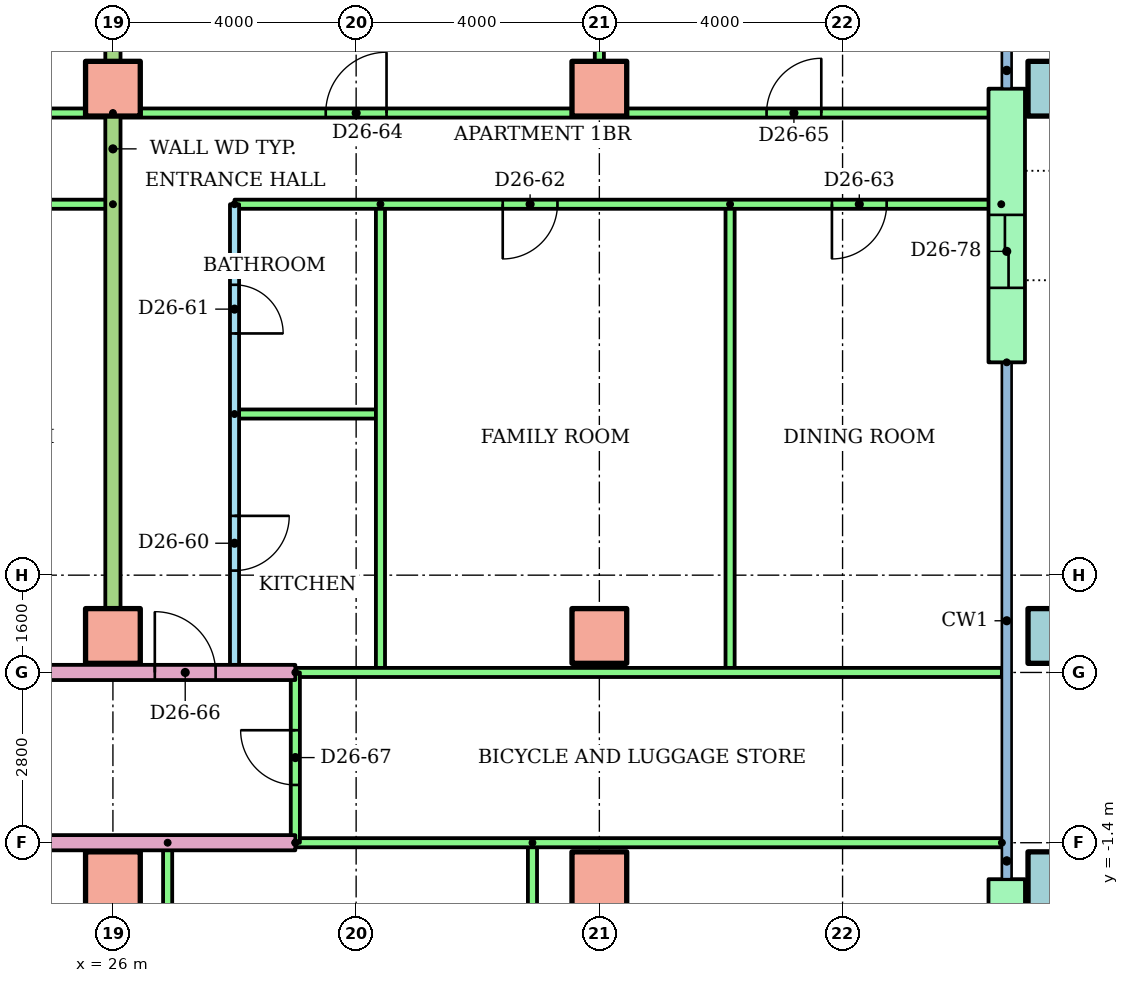
"""IFC4 building model, lengths in metres.
Left out: names, types, materials, properties, quantities, classifications, styles, units other than length and angle.
Written with IfcOpenShell. Run it as: python <this file> out.ifc"""

import sys

from ifc_helpers import new_model, si_unit, direction, frame, frame_2d, origin, origin_2d, place, context, subcontext, project, spatial, rectangle, hollow_rectangle, extrude, element, fill, save


model = new_model("IFC4")
c1 = context("Model", 3, precision=1e-05, world=origin(), true_north=direction((0.0, 1.0)))
c2 = subcontext(c1, "Body", "Model", "MODEL_VIEW")
j1 = project(units=[si_unit("LENGTHUNIT", "METRE"), si_unit("PLANEANGLEUNIT", "RADIAN")], contexts=[c1])
p1 = place(None, origin())
s1 = spatial("IfcSite", under=j1, at=p1, CompositionType="ELEMENT")
p2 = place(p1, origin())
s2 = spatial("IfcBuilding", under=s1, at=p2, CompositionType="ELEMENT")
p3 = place(p2, frame((0.0, 0.0, 99.9)))
s3 = spatial("IfcBuildingStorey", under=s2, at=p3, CompositionType="ELEMENT", Elevation=99.9)
for number, where in (
    (1, (26.0, -2.0, 0.0)),
    (2, (34.0, -2.0, 0.0)),
):
    element("IfcColumn", number, at=place(p3, frame(where)), inside=s3, PredefinedType="COLUMN", context=c2, shape_type="SweptSolid", body=[
        extrude(rectangle(XDim=0.9, YDim=0.9, at=origin_2d()), origin(), (0.0, 0.0, 1.0), 3.2),
    ])
p4 = place(p3, frame((41.5, -2.0, 0.0)))
e3 = element("IfcColumn", 3, at=p4, inside=s3, PredefinedType="COLUMN", context=c2, shape_type="SweptSolid", body=[
    extrude(hollow_rectangle(XDim=0.9, YDim=0.9, WallThickness=0.045, at=origin_2d()), origin(), (0.0, 0.0, 1.0), 3.2),
])
for number, where in (
    (4, (26.0, 2.0, 0.0)),
    (5, (34.0, 2.0, 0.0)),
):
    element("IfcColumn", number, at=place(p3, frame(where)), inside=s3, PredefinedType="COLUMN", context=c2, shape_type="SweptSolid", body=[
        extrude(rectangle(XDim=0.9, YDim=0.9, at=origin_2d()), origin(), (0.0, 0.0, 1.0), 3.2),
    ])
p5 = place(p3, frame((41.5, 2.0, 0.0)))
e6 = element("IfcColumn", 6, at=p5, inside=s3, PredefinedType="COLUMN", context=c2, shape_type="SweptSolid", body=[
    extrude(hollow_rectangle(XDim=0.9, YDim=0.9, WallThickness=0.045, at=origin_2d()), origin(), (0.0, 0.0, 1.0), 3.2),
])
for number, where in (
    (7, (26.0, 11.0, 0.0)),
    (8, (34.0, 11.0, 0.0)),
):
    element("IfcColumn", number, at=place(p3, frame(where)), inside=s3, PredefinedType="COLUMN", context=c2, shape_type="SweptSolid", body=[
        extrude(rectangle(XDim=0.9, YDim=0.9, at=origin_2d()), origin(), (0.0, 0.0, 1.0), 3.2),
    ])
p6 = place(p3, frame((41.5, 11.0, 0.0)))
e9 = element("IfcColumn", 9, at=p6, inside=s3, PredefinedType="COLUMN", context=c2, shape_type="SweptSolid", body=[
    extrude(hollow_rectangle(XDim=0.9, YDim=0.9, WallThickness=0.045, at=origin_2d()), origin(), (0.0, 0.0, 1.0), 3.2),
])
p7 = place(p3, frame((40.7, -5.7, 0.0), z_axis=(0.0, 0.0, 1.0), x_axis=(0.0, 1.0, 0.0)))
e10 = element("IfcWall", 10, at=p7, inside=s3, PredefinedType="STANDARD", context=c2, shape_type="SweptSolid", body=[
    extrude(rectangle(XDim=3.7, YDim=0.6, at=frame_2d((1.85, 0.0))), origin(), (0.0, 0.0, 1.0), 2.92),
])
p8 = place(p7, frame((1.25, 0.0, 0.0)))
e11 = element("IfcOpeningElement", 11, at=p8, cuts=e10, PredefinedType="OPENING", context=c2, shape_type="SweptSolid", body=[
    extrude(rectangle(XDim=1.2, YDim=2.1, at=frame_2d((0.6, 1.05))), frame((0.0, 0.31, 0.0), z_axis=(0.0, -1.0, 0.0), x_axis=(1.0, 0.0, 0.0)), (0.0, 0.0, 1.0), 0.62),
])
p9 = place(p3, frame((40.7, 6.5, 0.0), z_axis=(0.0, 0.0, 1.0), x_axis=(0.0, 1.0, 0.0)))
e12 = element("IfcWall", 12, at=p9, inside=s3, PredefinedType="STANDARD", context=c2, shape_type="SweptSolid", body=[
    extrude(rectangle(XDim=4.5, YDim=0.6, at=frame_2d((2.25, 0.0))), origin(), (0.0, 0.0, 1.0), 2.92),
])
p10 = place(p9, frame((1.225, 0.0, 0.0)))
e13 = element("IfcOpeningElement", 13, at=p10, cuts=e12, PredefinedType="OPENING", context=c2, shape_type="SweptSolid", body=[
    extrude(rectangle(XDim=1.2, YDim=2.1, at=frame_2d((0.6, 1.05))), frame((0.0, 0.31, 0.0), z_axis=(0.0, -1.0, 0.0), x_axis=(1.0, 0.0, 0.0)), (0.0, 0.0, 1.0), 0.62),
])
for number, where, z_axis, x_axis in (
    (14, (26.9, -1.4, 0.0), (0.0, 0.0, 1.0), (0.0, -1.0, 0.0)),
    (15, (32.9, -1.4, 0.0), (0.0, 0.0, 1.0), (0.0, -1.0, 0.0)),
):
    element("IfcWall", number, at=place(p3, frame(where, z_axis=z_axis, x_axis=x_axis)), inside=s3, PredefinedType="PARTITIONING", context=c2, shape_type="SweptSolid", body=[
        extrude(rectangle(XDim=5.3, YDim=0.15, at=frame_2d((2.65, 0.0))), origin(), (0.0, 0.0, 1.0), 2.4),
    ])
p11 = place(p3, frame((29.0, -1.4, 0.0), z_axis=(0.0, 0.0, 1.0), x_axis=(-1.0, 0.0, 0.0)))
e16 = element("IfcWall", 16, at=p11, inside=s3, PredefinedType="PARTITIONING", context=c2, shape_type="SweptSolid", body=[
    extrude(rectangle(XDim=15.0, YDim=0.25, at=frame_2d((7.5, 0.0))), origin(), (0.0, 0.0, 1.0), 2.4),
])
p12 = place(p11, frame((9.311, 0.0, 0.0)))
e17 = element("IfcOpeningElement", 17, at=p12, cuts=e16, PredefinedType="OPENING", context=c2, shape_type="SweptSolid", body=[
    extrude(rectangle(XDim=1.0, YDim=2.1, at=frame_2d((0.5, 1.05))), frame((0.0, 0.135, 0.0), z_axis=(0.0, -1.0, 0.0), x_axis=(1.0, 0.0, 0.0)), (0.0, 0.0, 1.0), 0.27),
])
p13 = place(p3, frame((40.62, -1.4, 0.0), z_axis=(0.0, 0.0, 1.0), x_axis=(-1.0, 0.0, 0.0)))
e18 = element("IfcWall", 18, at=p13, inside=s3, PredefinedType="PARTITIONING", context=c2, shape_type="SweptSolid", body=[
    extrude(rectangle(XDim=11.62, YDim=0.15, at=frame_2d((5.81, 0.0))), origin(), (0.0, 0.0, 1.0), 2.4),
])
p14 = place(p3, frame((26.0, 9.1, 0.0), z_axis=(0.0, 0.0, 1.0), x_axis=(-1.0, 0.0, 0.0)))
e19 = element("IfcWall", 19, at=p14, inside=s3, PredefinedType="PARTITIONING", context=c2, shape_type="SweptSolid", body=[
    extrude(rectangle(XDim=10.0, YDim=0.15, at=frame_2d((5.0, 0.0))), origin(), (0.0, 0.0, 1.0), 2.4),
])
p15 = place(p14, frame((5.525, 0.0, 0.0)))
e20 = element("IfcOpeningElement", 20, at=p15, cuts=e19, PredefinedType="OPENING", context=c2, shape_type="SweptSolid", body=[
    extrude(rectangle(XDim=0.9, YDim=2.1, at=frame_2d((0.45, 1.05))), frame((0.0, 0.085, 0.0), z_axis=(0.0, -1.0, 0.0), x_axis=(1.0, 0.0, 0.0)), (0.0, 0.0, 1.0), 0.17),
])
p16 = place(p14, frame((1.725, 0.0, 0.0)))
e21 = element("IfcOpeningElement", 21, at=p16, cuts=e19, PredefinedType="OPENING", context=c2, shape_type="SweptSolid", body=[
    extrude(rectangle(XDim=0.9, YDim=2.1, at=frame_2d((0.45, 1.05))), frame((0.0, 0.085, 0.0), z_axis=(0.0, -1.0, 0.0), x_axis=(1.0, 0.0, 0.0)), (0.0, 0.0, 1.0), 0.17),
])
p17 = place(p3, frame((14.0, 10.6, 0.0)))
e22 = element("IfcWall", 22, at=p17, inside=s3, PredefinedType="PARTITIONING", context=c2, shape_type="SweptSolid", body=[
    extrude(rectangle(XDim=12.0, YDim=0.15, at=frame_2d((6.0, 0.0))), origin(), (0.0, 0.0, 1.0), 2.4),
])
p18 = place(p17, frame((1.5, 0.0, 0.0)))
e23 = element("IfcOpeningElement", 23, at=p18, cuts=e22, PredefinedType="OPENING", context=c2, shape_type="SweptSolid", body=[
    extrude(rectangle(XDim=1.0, YDim=2.1, at=frame_2d((0.5, 1.05))), frame((0.0, 0.085, 0.0), z_axis=(0.0, -1.0, 0.0), x_axis=(1.0, 0.0, 0.0)), (0.0, 0.0, 1.0), 0.17),
])
p19 = place(p17, frame((7.5, 0.0, 0.0)))
e24 = element("IfcOpeningElement", 24, at=p19, cuts=e22, PredefinedType="OPENING", context=c2, shape_type="SweptSolid", body=[
    extrude(rectangle(XDim=1.0, YDim=2.1, at=frame_2d((0.5, 1.05))), frame((0.0, 0.085, 0.0), z_axis=(0.0, -1.0, 0.0), x_axis=(1.0, 0.0, 0.0)), (0.0, 0.0, 1.0), 0.17),
])
p20 = place(p3, frame((28.0, 9.1, 0.0), z_axis=(0.0, 0.0, 1.0), x_axis=(0.0, -1.0, 0.0)))
e25 = element("IfcWall", 25, at=p20, inside=s3, PredefinedType="PARTITIONING", context=c2, shape_type="SweptSolid", body=[
    extrude(rectangle(XDim=7.7, YDim=0.15, at=frame_2d((3.85, 0.0))), origin(), (0.0, 0.0, 1.0), 2.4),
])
p21 = place(p20, frame((5.125, 0.0, 0.0)))
e26 = element("IfcOpeningElement", 26, at=p21, cuts=e25, PredefinedType="OPENING", context=c2, shape_type="SweptSolid", body=[
    extrude(rectangle(XDim=0.9, YDim=2.1, at=frame_2d((0.45, 1.05))), frame((0.0, 0.085, 0.0), z_axis=(0.0, -1.0, 0.0), x_axis=(1.0, 0.0, 0.0)), (0.0, 0.0, 1.0), 0.17),
])
p22 = place(p20, frame((1.325, 0.0, 0.0)))
e27 = element("IfcOpeningElement", 27, at=p22, cuts=e25, PredefinedType="OPENING", context=c2, shape_type="SweptSolid", body=[
    extrude(rectangle(XDim=0.8, YDim=2.1, at=frame_2d((0.4, 1.05))), frame((0.0, 0.085, 0.0), z_axis=(0.0, -1.0, 0.0), x_axis=(1.0, 0.0, 0.0)), (0.0, 0.0, 1.0), 0.17),
])
p23 = place(p3, frame((28.0, 5.65, 0.0)))
e28 = element("IfcWall", 28, at=p23, inside=s3, PredefinedType="PARTITIONING", context=c2, shape_type="SweptSolid", body=[
    extrude(rectangle(XDim=2.4, YDim=0.15, at=frame_2d((1.2, 0.0))), origin(), (0.0, 0.0, 1.0), 2.4),
])
for number, where, z_axis, x_axis in (
    (29, (30.4, 9.1, 0.0), (0.0, 0.0, 1.0), (0.0, -1.0, 0.0)),
    (30, (36.15, 9.1, 0.0), (0.0, 0.0, 1.0), (0.0, -1.0, 0.0)),
):
    element("IfcWall", number, at=place(p3, frame(where, z_axis=z_axis, x_axis=x_axis)), inside=s3, PredefinedType="PARTITIONING", context=c2, shape_type="SweptSolid", body=[
        extrude(rectangle(XDim=7.7, YDim=0.15, at=frame_2d((3.85, 0.0))), origin(), (0.0, 0.0, 1.0), 2.4),
    ])
p24 = place(p3, frame((40.61, 9.1, 0.0), z_axis=(0.0, 0.0, 1.0), x_axis=(-1.0, 0.0, 0.0)))
e31 = element("IfcWall", 31, at=p24, inside=s3, PredefinedType="PARTITIONING", context=c2, shape_type="SweptSolid", body=[
    extrude(rectangle(XDim=12.61, YDim=0.15, at=frame_2d((6.305, 0.0))), origin(), (0.0, 0.0, 1.0), 2.4),
])
p25 = place(p24, frame((7.299, 0.0, 0.0)))
e32 = element("IfcOpeningElement", 32, at=p25, cuts=e31, PredefinedType="OPENING", context=c2, shape_type="SweptSolid", body=[
    extrude(rectangle(XDim=0.9, YDim=2.1, at=frame_2d((0.45, 1.05))), frame((0.0, 0.085, 0.0), z_axis=(0.0, -1.0, 0.0), x_axis=(1.0, 0.0, 0.0)), (0.0, 0.0, 1.0), 0.17),
])
p26 = place(p24, frame((1.885, 0.0, 0.0)))
e33 = element("IfcOpeningElement", 33, at=p26, cuts=e31, PredefinedType="OPENING", context=c2, shape_type="SweptSolid", body=[
    extrude(rectangle(XDim=0.9, YDim=2.1, at=frame_2d((0.45, 1.05))), frame((0.0, 0.085, 0.0), z_axis=(0.0, -1.0, 0.0), x_axis=(1.0, 0.0, 0.0)), (0.0, 0.0, 1.0), 0.17),
])
p27 = place(p3, frame((26.0, 10.6, 0.0)))
e34 = element("IfcWall", 34, at=p27, inside=s3, PredefinedType="PARTITIONING", context=c2, shape_type="SweptSolid", body=[
    extrude(rectangle(XDim=14.61, YDim=0.15, at=frame_2d((7.305, 0.0))), origin(), (0.0, 0.0, 1.0), 2.4),
])
p28 = place(p27, frame((3.5, 0.0, 0.0)))
e35 = element("IfcOpeningElement", 35, at=p28, cuts=e34, PredefinedType="OPENING", context=c2, shape_type="SweptSolid", body=[
    extrude(rectangle(XDim=1.0, YDim=2.1, at=frame_2d((0.5, 1.05))), frame((0.0, 0.085, 0.0), z_axis=(0.0, -1.0, 0.0), x_axis=(1.0, 0.0, 0.0)), (0.0, 0.0, 1.0), 0.17),
])
p29 = place(p27, frame((10.75, 0.0, 0.0)))
e36 = element("IfcOpeningElement", 36, at=p29, cuts=e34, PredefinedType="OPENING", context=c2, shape_type="SweptSolid", body=[
    extrude(rectangle(XDim=0.9, YDim=2.1, at=frame_2d((0.45, 1.05))), frame((0.0, 0.085, 0.0), z_axis=(0.0, -1.0, 0.0), x_axis=(1.0, 0.0, 0.0)), (0.0, 0.0, 1.0), 0.17),
])
p30 = place(p3, frame((34.0, 18.621, 0.0), z_axis=(0.0, 0.0, 1.0), x_axis=(0.0, -1.0, 0.0)))
e37 = element("IfcWall", 37, at=p30, inside=s3, PredefinedType="PARTITIONING", context=c2, shape_type="SweptSolid", body=[
    extrude(rectangle(XDim=8.021, YDim=0.15, at=frame_2d((4.01, 0.0))), origin(), (0.0, 0.0, 1.0), 2.4),
])
p31 = place(p3, frame((26.0, 18.621, 0.0), z_axis=(0.0, 0.0, 1.0), x_axis=(0.0, -1.0, 0.0)))
e38 = element("IfcWall", 38, at=p31, inside=s3, PredefinedType="PARTITIONING", context=c2, shape_type="SweptSolid", body=[
    extrude(rectangle(XDim=17.221, YDim=0.25, at=frame_2d((8.611, 0.0))), origin(), (0.0, 0.0, 1.0), 2.4),
])
p32 = place(p3, frame((14.0, 1.4, 0.0)))
e39 = element("IfcWall", 39, at=p32, inside=s3, PredefinedType="PARTITIONING", context=c2, shape_type="SweptSolid", body=[
    extrude(rectangle(XDim=15.0, YDim=0.25, at=frame_2d((7.5, 0.0))), origin(), (0.0, 0.0, 1.0), 2.4),
])
p33 = place(p32, frame((0.5, 0.0, 0.0)))
e40 = element("IfcOpeningElement", 40, at=p33, cuts=e39, PredefinedType="OPENING", context=c2, shape_type="SweptSolid", body=[
    extrude(rectangle(XDim=1.0, YDim=2.1, at=frame_2d((0.5, 1.05))), frame((0.0, 0.135, 0.0), z_axis=(0.0, -1.0, 0.0), x_axis=(1.0, 0.0, 0.0)), (0.0, 0.0, 1.0), 0.27),
])
p34 = place(p32, frame((12.689, 0.0, 0.0)))
e41 = element("IfcOpeningElement", 41, at=p34, cuts=e39, PredefinedType="OPENING", context=c2, shape_type="SweptSolid", body=[
    extrude(rectangle(XDim=1.0, YDim=2.1, at=frame_2d((0.5, 1.05))), frame((0.0, 0.135, 0.0), z_axis=(0.0, -1.0, 0.0), x_axis=(1.0, 0.0, 0.0)), (0.0, 0.0, 1.0), 0.27),
])
p35 = place(p3, frame((29.0, 1.4, 0.0)))
e42 = element("IfcWall", 42, at=p35, inside=s3, PredefinedType="PARTITIONING", context=c2, shape_type="SweptSolid", body=[
    extrude(rectangle(XDim=11.62, YDim=0.15, at=frame_2d((5.81, 0.0))), origin(), (0.0, 0.0, 1.0), 2.4),
])
p36 = place(p3, frame((29.0, -1.4, 0.0), z_axis=(0.0, 0.0, 1.0), x_axis=(0.0, 1.0, 0.0)))
e43 = element("IfcWall", 43, at=p36, inside=s3, PredefinedType="PARTITIONING", context=c2, shape_type="SweptSolid", body=[
    extrude(rectangle(XDim=2.8, YDim=0.15, at=frame_2d((1.4, 0.0))), origin(), (0.0, 0.0, 1.0), 2.4),
])
p37 = place(p36, frame((0.95, 0.0, 0.0)))
e44 = element("IfcOpeningElement", 44, at=p37, cuts=e43, PredefinedType="OPENING", context=c2, shape_type="SweptSolid", body=[
    extrude(rectangle(XDim=0.9, YDim=2.1, at=frame_2d((0.45, 1.05))), frame((0.0, 0.085, 0.0), z_axis=(0.0, -1.0, 0.0), x_axis=(1.0, 0.0, 0.0)), (0.0, 0.0, 1.0), 0.17),
])
p38 = place(p21, origin())
e45 = element("IfcDoor", 45, at=p38, inside=s3, OperationType="SINGLE_SWING_LEFT", PredefinedType="DOOR", context=c2, shape_type="SweptSolid", body=[
    extrude(rectangle(XDim=0.9, YDim=2.1, at=frame_2d((0.45, 1.05))), frame((0.0, 0.025, 0.0), z_axis=(0.0, -1.0, 0.0), x_axis=(1.0, 0.0, 0.0)), (0.0, 0.0, 1.0), 0.05),
])
fill(e26, e45)
p39 = place(p22, origin())
e46 = element("IfcDoor", 46, at=p39, inside=s3, OperationType="SINGLE_SWING_RIGHT", PredefinedType="DOOR", context=c2, shape_type="SweptSolid", body=[
    extrude(rectangle(XDim=0.8, YDim=2.1, at=frame_2d((0.4, 1.05))), frame((0.0, 0.025, 0.0), z_axis=(0.0, -1.0, 0.0), x_axis=(1.0, 0.0, 0.0)), (0.0, 0.0, 1.0), 0.05),
])
fill(e27, e46)
p40 = place(p25, origin())
e47 = element("IfcDoor", 47, at=p40, inside=s3, OperationType="SINGLE_SWING_RIGHT", PredefinedType="DOOR", context=c2, shape_type="SweptSolid", body=[
    extrude(rectangle(XDim=0.9, YDim=2.1, at=frame_2d((0.45, 1.05))), frame((0.0, 0.025, 0.0), z_axis=(0.0, -1.0, 0.0), x_axis=(1.0, 0.0, 0.0)), (0.0, 0.0, 1.0), 0.05),
])
fill(e32, e47)
p41 = place(p26, origin())
e48 = element("IfcDoor", 48, at=p41, inside=s3, OperationType="SINGLE_SWING_RIGHT", PredefinedType="DOOR", context=c2, shape_type="SweptSolid", body=[
    extrude(rectangle(XDim=0.9, YDim=2.1, at=frame_2d((0.45, 1.05))), frame((0.0, 0.025, 0.0), z_axis=(0.0, -1.0, 0.0), x_axis=(1.0, 0.0, 0.0)), (0.0, 0.0, 1.0), 0.05),
])
fill(e33, e48)
p42 = place(p28, origin())
e49 = element("IfcDoor", 49, at=p42, inside=s3, OperationType="SINGLE_SWING_RIGHT", PredefinedType="DOOR", context=c2, shape_type="SweptSolid", body=[
    extrude(rectangle(XDim=1.0, YDim=2.1, at=frame_2d((0.5, 1.05))), frame((0.0, 0.025, 0.0), z_axis=(0.0, -1.0, 0.0), x_axis=(1.0, 0.0, 0.0)), (0.0, 0.0, 1.0), 0.05),
])
fill(e35, e49)
p43 = place(p29, origin())
e50 = element("IfcDoor", 50, at=p43, inside=s3, OperationType="SINGLE_SWING_RIGHT", PredefinedType="DOOR", context=c2, shape_type="SweptSolid", body=[
    extrude(rectangle(XDim=0.9, YDim=2.1, at=frame_2d((0.45, 1.05))), frame((0.0, 0.025, 0.0), z_axis=(0.0, -1.0, 0.0), x_axis=(1.0, 0.0, 0.0)), (0.0, 0.0, 1.0), 0.05),
])
fill(e36, e50)
p44 = place(p34, origin())
e51 = element("IfcDoor", 51, at=p44, inside=s3, OperationType="SINGLE_SWING_LEFT", PredefinedType="DOOR", context=c2, shape_type="SweptSolid", body=[
    extrude(rectangle(XDim=1.0, YDim=2.1, at=frame_2d((0.5, 1.05))), frame((0.0, 0.025, 0.0), z_axis=(0.0, -1.0, 0.0), x_axis=(1.0, 0.0, 0.0)), (0.0, 0.0, 1.0), 0.05),
])
fill(e41, e51)
p45 = place(p37, origin())
e52 = element("IfcDoor", 52, at=p45, inside=s3, OperationType="SINGLE_SWING_RIGHT", PredefinedType="DOOR", context=c2, shape_type="SweptSolid", body=[
    extrude(rectangle(XDim=0.9, YDim=2.1, at=frame_2d((0.45, 1.05))), frame((0.0, 0.025, 0.0), z_axis=(0.0, -1.0, 0.0), x_axis=(1.0, 0.0, 0.0)), (0.0, 0.0, 1.0), 0.05),
])
fill(e44, e52)
p46 = place(p10, origin())
e53 = element("IfcDoor", 53, at=p46, inside=s3, OperationType="SLIDING_TO_LEFT", PredefinedType="DOOR", context=c2, shape_type="SweptSolid", body=[
    extrude(rectangle(XDim=1.2, YDim=2.1, at=frame_2d((0.6, 1.05))), frame((0.0, 0.025, 0.0), z_axis=(0.0, -1.0, 0.0), x_axis=(1.0, 0.0, 0.0)), (0.0, 0.0, 1.0), 0.05),
])
fill(e13, e53)
save(model, sys.argv[1])
